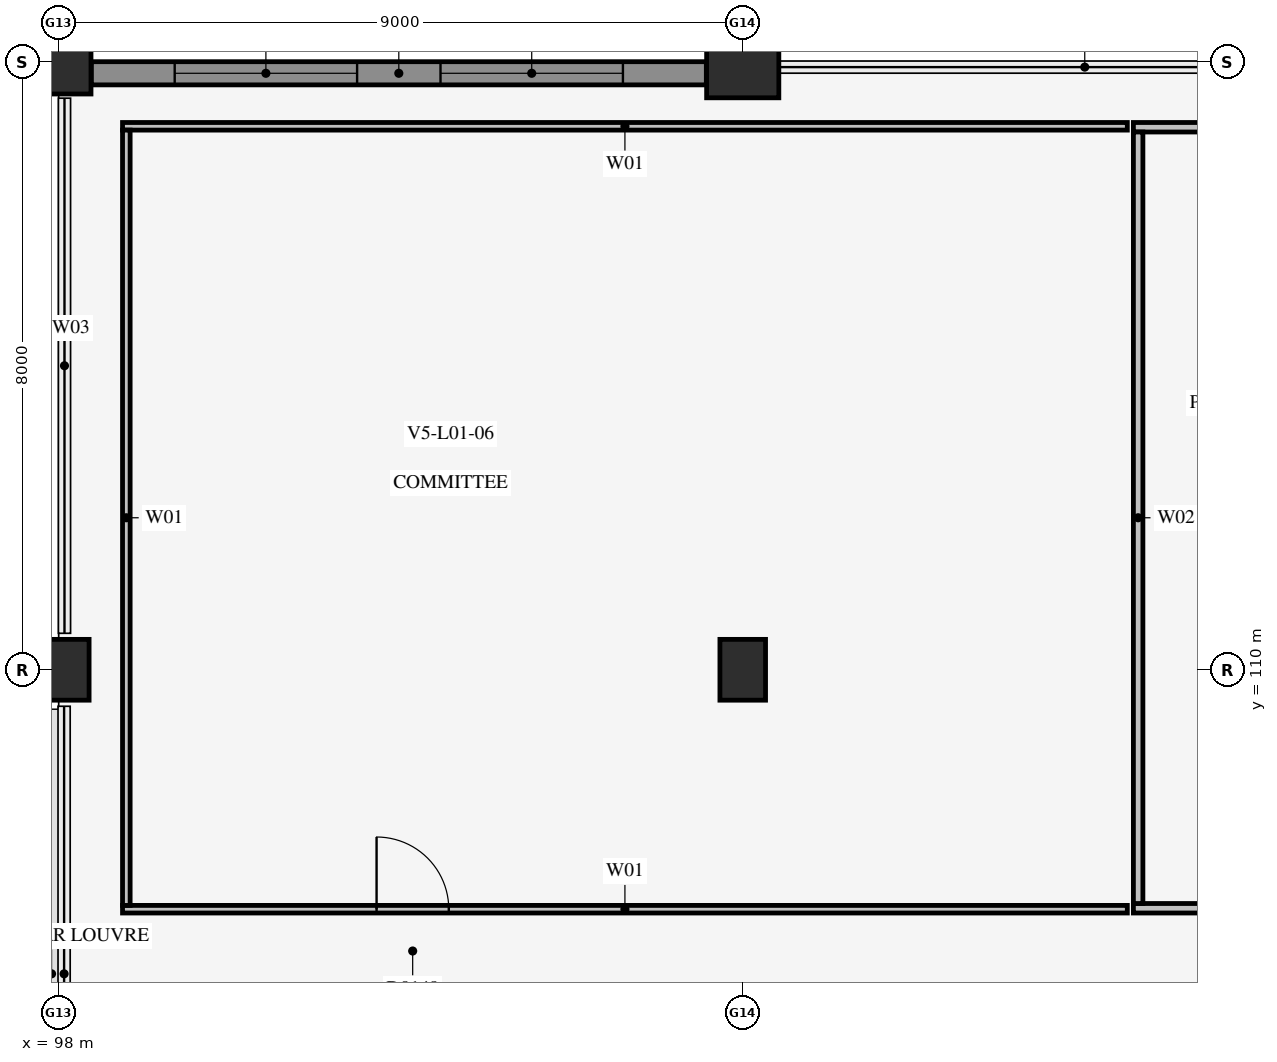
"""IFC4 building model, lengths in metres.
Left out: names, types, materials, properties, quantities, classifications, styles, units other than length and angle.
Written with IfcOpenShell. Run it as: python <this file> out.ifc"""

import sys

from ifc_helpers import new_model, si_unit, direction, frame, frame_2d, origin, origin_2d, place, context, subcontext, project, spatial, rectangle, extrude, element, fill, save


model = new_model("IFC4")
c1 = context("Model", 3, precision=1e-05, world=origin(), true_north=direction((0.0, 1.0)))
c2 = subcontext(c1, "Body", "Model", "MODEL_VIEW")
j1 = project(units=[si_unit("LENGTHUNIT", "METRE"), si_unit("PLANEANGLEUNIT", "RADIAN")], contexts=[c1])
p1 = place(None, origin())
s1 = spatial("IfcSite", under=j1, at=p1, CompositionType="ELEMENT")
p2 = place(p1, origin())
s2 = spatial("IfcBuilding", under=s1, at=p2, CompositionType="ELEMENT")
p3 = place(p2, frame((0.0, 0.0, 5.4)))
s3 = spatial("IfcBuildingStorey", under=s2, at=p3, CompositionType="ELEMENT", Elevation=5.4)
p4 = place(p3, frame((98.0, 110.0, 0.0), z_axis=(0.0, 0.0, 1.0), x_axis=(1.0, 0.0, 0.0)))
e1 = element("IfcColumn", 1, at=p4, inside=s3, PredefinedType="COLUMN", context=c2, shape_type="SweptSolid", body=[
    extrude(rectangle(XDim=0.8, YDim=0.8, at=origin_2d()), origin(), (0.0, 0.0, 1.0), 4.8),
])
p5 = place(p3, frame((98.0, 118.0, 0.0), z_axis=(0.0, 0.0, 1.0), x_axis=(1.0, 0.0, 0.0)))
e2 = element("IfcColumn", 2, at=p5, inside=s3, PredefinedType="COLUMN", context=c2, shape_type="SweptSolid", body=[
    extrude(rectangle(XDim=0.85, YDim=0.85, at=origin_2d()), origin(), (0.0, 0.0, 1.0), 4.8),
])
p6 = place(p3, frame((107.0, 110.0, 0.0), z_axis=(0.0, 0.0, 1.0), x_axis=(1.0, 0.0, 0.0)))
e3 = element("IfcColumn", 3, at=p6, inside=s3, PredefinedType="COLUMN", context=c2, shape_type="SweptSolid", body=[
    extrude(rectangle(XDim=0.6, YDim=0.8, at=origin_2d()), origin(), (0.0, 0.0, 1.0), 4.8),
])
p7 = place(p3, frame((107.0, 118.0, 0.0), z_axis=(0.0, 0.0, 1.0), x_axis=(1.0, 0.0, 0.0)))
e4 = element("IfcColumn", 4, at=p7, inside=s3, PredefinedType="COLUMN", context=c2, shape_type="SweptSolid", body=[
    extrude(rectangle(XDim=0.95, YDim=0.95, at=origin_2d()), origin(), (0.0, 0.0, 1.0), 4.8),
])
p8 = place(p3, frame((98.84, 106.85, 0.0), z_axis=(0.0, 0.0, 1.0), x_axis=(1.0, 0.0, 0.0)))
e5 = element("IfcWall", 5, at=p8, inside=s3, PredefinedType="PARTITIONING", context=c2, shape_type="SweptSolid", body=[
    extrude(rectangle(XDim=13.22, YDim=0.1, at=frame_2d((6.61, 0.0))), origin(), (0.0, 0.0, 1.0), 4.545),
])
p9 = place(p8, frame((3.343, 0.0, 0.0)))
e6 = element("IfcOpeningElement", 6, at=p9, cuts=e5, PredefinedType="OPENING", context=c2, shape_type="SweptSolid", body=[
    extrude(rectangle(XDim=0.95, YDim=2.15, at=frame_2d((0.475, 1.075))), frame((0.0, 0.062, 0.0), z_axis=(0.0, -1.0, 0.0), x_axis=(1.0, 0.0, 0.0)), (0.0, 0.0, 1.0), 0.124),
])
p10 = place(p3, frame((98.84, 117.15, 0.0), z_axis=(0.0, 0.0, 1.0), x_axis=(1.0, 0.0, 0.0)))
e7 = element("IfcWall", 7, at=p10, inside=s3, PredefinedType="PARTITIONING", context=c2, shape_type="SweptSolid", body=[
    extrude(rectangle(XDim=13.22, YDim=0.1, at=frame_2d((6.61, 0.0))), origin(), (0.0, 0.0, 1.0), 4.545),
])
p11 = place(p3, frame((98.89, 106.9, 0.0), z_axis=(0.0, 0.0, 1.0), x_axis=(0.0, 1.0, 0.0)))
e8 = element("IfcWall", 8, at=p11, inside=s3, PredefinedType="PARTITIONING", context=c2, shape_type="SweptSolid", body=[
    extrude(rectangle(XDim=10.2, YDim=0.1, at=frame_2d((5.1, 0.0))), origin(), (0.0, 0.0, 1.0), 4.545),
])
p12 = place(p3, frame((112.14, 106.863, 0.0), z_axis=(0.0, 0.0, 1.0), x_axis=(1.0, 0.0, 0.0)))
e9 = element("IfcWall", 9, at=p12, inside=s3, PredefinedType="PARTITIONING", context=c2, shape_type="SweptSolid", body=[
    extrude(rectangle(XDim=13.22, YDim=0.125, at=frame_2d((6.61, 0.0))), origin(), (0.0, 0.0, 1.0), 4.545),
])
p13 = place(p12, frame((7.413, 0.0, 0.0)))
e10 = element("IfcOpeningElement", 10, at=p13, cuts=e9, PredefinedType="OPENING", context=c2, shape_type="SweptSolid", body=[
    extrude(rectangle(XDim=1.05, YDim=2.15, at=frame_2d((0.525, 1.075))), frame((0.0, 0.074, 0.0), z_axis=(0.0, -1.0, 0.0), x_axis=(1.0, 0.0, 0.0)), (0.0, 0.0, 1.0), 0.149),
])
p14 = place(p3, frame((112.14, 117.137, 0.0), z_axis=(0.0, 0.0, 1.0), x_axis=(1.0, 0.0, 0.0)))
e11 = element("IfcWall", 11, at=p14, inside=s3, PredefinedType="PARTITIONING", context=c2, shape_type="SweptSolid", body=[
    extrude(rectangle(XDim=13.22, YDim=0.125, at=frame_2d((6.61, 0.0))), origin(), (0.0, 0.0, 1.0), 4.545),
])
p15 = place(p3, frame((112.202, 106.925, 0.0), z_axis=(0.0, 0.0, 1.0), x_axis=(0.0, 1.0, 0.0)))
e12 = element("IfcWall", 12, at=p15, inside=s3, PredefinedType="PARTITIONING", context=c2, shape_type="SweptSolid", body=[
    extrude(rectangle(XDim=10.15, YDim=0.125, at=frame_2d((5.075, 0.0))), origin(), (0.0, 0.0, 1.0), 4.545),
])
p16 = place(p3, frame((98.429, 117.847, 0.0), z_axis=(0.0, 0.0, 1.0), x_axis=(1.0, 0.0, 0.0)))
e13 = element("IfcWall", 13, at=p16, inside=s3, PredefinedType="SOLIDWALL", context=c2, shape_type="SweptSolid", body=[
    extrude(rectangle(XDim=8.092, YDim=0.305, at=frame_2d((4.046, 0.0))), origin(), (0.0, 0.0, 1.0), 4.07),
])
p17 = place(p16, frame((1.097, 0.0, 0.95)))
e14 = element("IfcOpeningElement", 14, at=p17, cuts=e13, PredefinedType="OPENING", context=c2, shape_type="SweptSolid", body=[
    extrude(rectangle(XDim=2.4, YDim=1.2, at=frame_2d((1.2, 0.6))), frame((0.0, 0.165, 0.0), z_axis=(0.0, -1.0, 0.0), x_axis=(1.0, 0.0, 0.0)), (0.0, 0.0, 1.0), 0.329),
])
p18 = place(p16, frame((4.595, 0.0, 0.95)))
e15 = element("IfcOpeningElement", 15, at=p18, cuts=e13, PredefinedType="OPENING", context=c2, shape_type="SweptSolid", body=[
    extrude(rectangle(XDim=2.4, YDim=1.2, at=frame_2d((1.2, 0.6))), frame((0.0, 0.165, 0.0), z_axis=(0.0, -1.0, 0.0), x_axis=(1.0, 0.0, 0.0)), (0.0, 0.0, 1.0), 0.329),
])
p19 = place(p9, origin())
e16 = element("IfcDoor", 16, at=p19, inside=s3, OperationType="SINGLE_SWING_LEFT", PredefinedType="DOOR", context=c2, shape_type="SweptSolid", body=[
    extrude(rectangle(XDim=0.95, YDim=2.15, at=frame_2d((0.475, 1.075))), frame((0.0, 0.025, 0.0), z_axis=(0.0, -1.0, 0.0), x_axis=(1.0, 0.0, 0.0)), (0.0, 0.0, 1.0), 0.05),
])
fill(e6, e16)
p20 = place(p17, origin())
e17 = element("IfcWindow", 17, at=p20, inside=s3, PartitioningType="SINGLE_PANEL", PredefinedType="WINDOW", context=c2, shape_type="SweptSolid", body=[
    extrude(rectangle(XDim=2.4, YDim=1.2, at=frame_2d((1.2, 0.6))), frame((0.0, 0.03, 0.0), z_axis=(0.0, -1.0, 0.0), x_axis=(1.0, 0.0, 0.0)), (0.0, 0.0, 1.0), 0.06),
])
fill(e14, e17)
p21 = place(p18, origin())
e18 = element("IfcWindow", 18, at=p21, inside=s3, PartitioningType="SINGLE_PANEL", PredefinedType="WINDOW", context=c2, shape_type="SweptSolid", body=[
    extrude(rectangle(XDim=2.4, YDim=1.2, at=frame_2d((1.2, 0.6))), frame((0.0, 0.03, 0.0), z_axis=(0.0, -1.0, 0.0), x_axis=(1.0, 0.0, 0.0)), (0.0, 0.0, 1.0), 0.06),
])
fill(e15, e18)
save(model, sys.argv[1])
